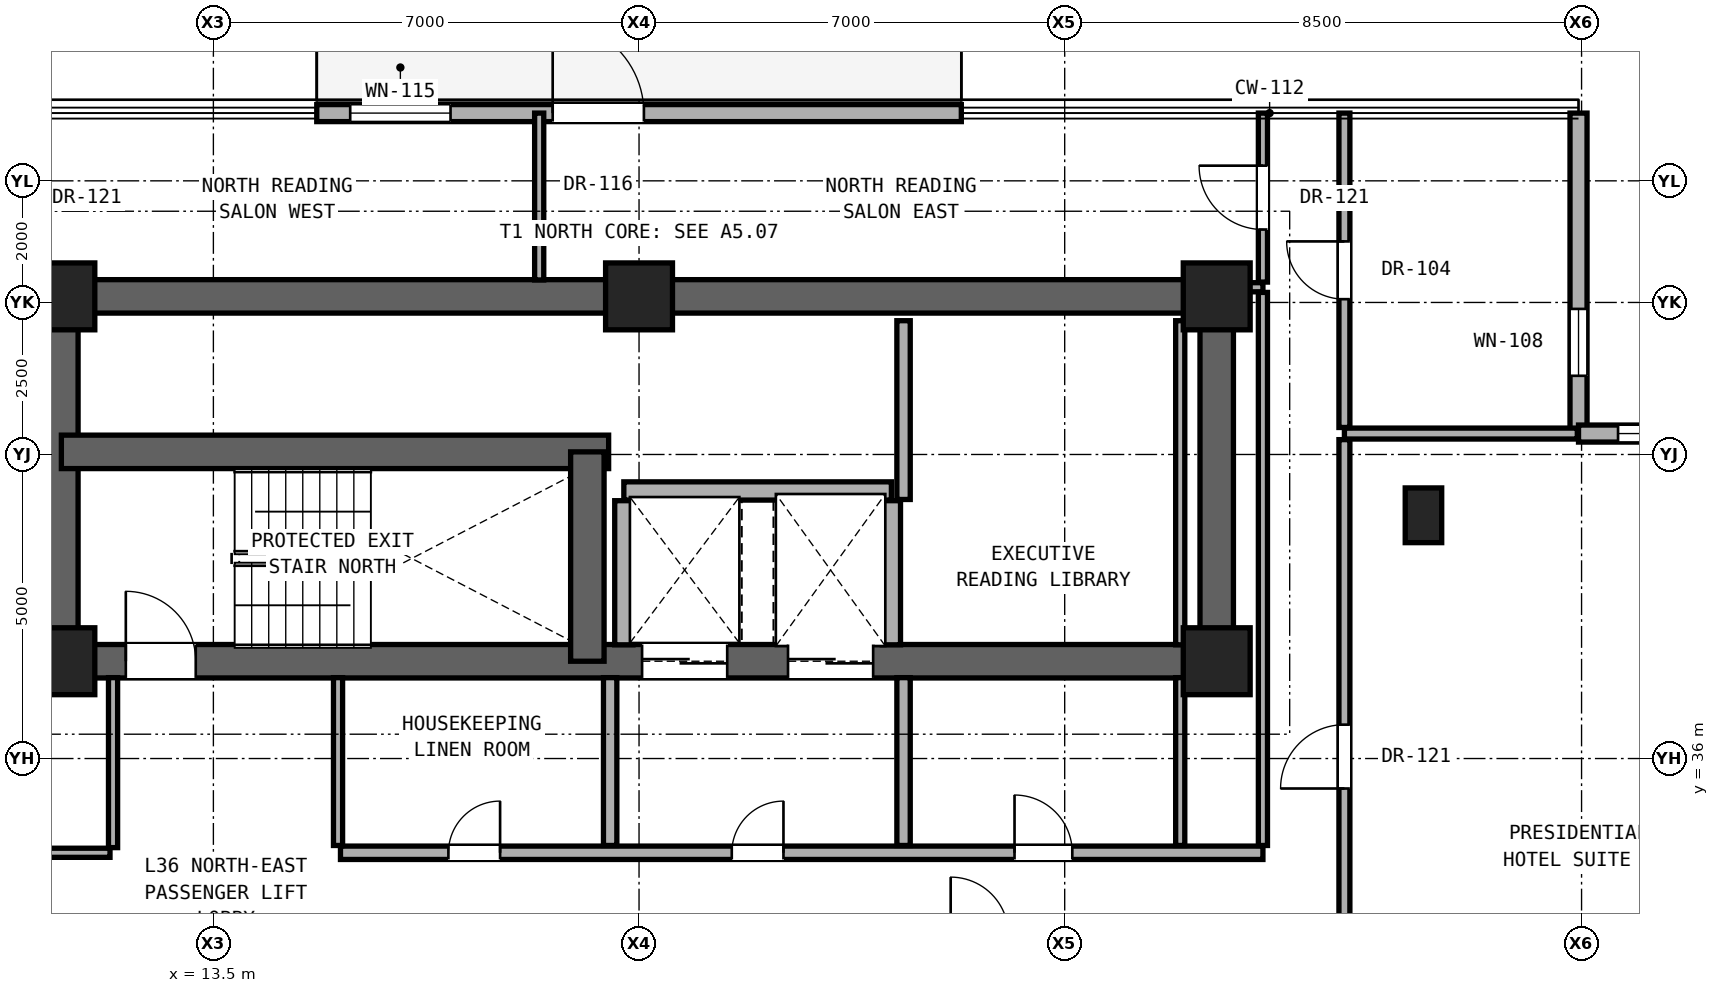
"""IFC4 building model, lengths in metres.
Left out: names, types, materials, properties, quantities, classifications, styles, units other than length and angle.
Written with IfcOpenShell. Run it as: python <this file> out.ifc"""

import sys

from ifc_helpers import new_model, si_unit, direction, frame, frame_2d, origin, origin_2d, place, context, subcontext, project, spatial, rectangle, extrude, element, fill, save


model = new_model("IFC4")
c1 = context("Model", 3, precision=1e-05, world=origin(), true_north=direction((0.0, 1.0)))
c2 = subcontext(c1, "Body", "Model", "MODEL_VIEW")
j1 = project(units=[si_unit("LENGTHUNIT", "METRE"), si_unit("PLANEANGLEUNIT", "RADIAN")], contexts=[c1])
p1 = place(None, origin())
s1 = spatial("IfcSite", under=j1, at=p1, CompositionType="ELEMENT")
p2 = place(p1, origin())
s2 = spatial("IfcBuilding", under=s1, at=p2, CompositionType="ELEMENT")
p3 = place(p2, frame((0.0, 0.0, 128.0)))
s3 = spatial("IfcBuildingStorey", under=s2, at=p3, CompositionType="ELEMENT", Elevation=128.0)
for number, where, z_axis, x_axis in (
    (1, (11.0, 37.6, 0.0), (0.0, 0.0, 1.0), (1.0, 0.0, 0.0)),
    (2, (30.0, 37.6, 0.0), (0.0, 0.0, 1.0), (1.0, 0.0, 0.0)),
    (3, (11.0, 43.6, 0.0), (0.0, 0.0, 1.0), (1.0, 0.0, 0.0)),
    (4, (20.5, 43.6, 0.0), (0.0, 0.0, 1.0), (1.0, 0.0, 0.0)),
    (5, (30.0, 43.6, 0.0), (0.0, 0.0, 1.0), (1.0, 0.0, 0.0)),
):
    element("IfcColumn", number, at=place(p3, frame(where, z_axis=z_axis, x_axis=x_axis)), inside=s3, PredefinedType="COLUMN", context=c2, shape_type="SweptSolid", body=[
        extrude(rectangle(XDim=1.1, YDim=1.1, at=origin_2d()), origin(), (0.0, 0.0, 1.0), 3.3),
    ])
p4 = place(p3, frame((33.4, 40.0, 0.0), z_axis=(0.0, 0.0, 1.0), x_axis=(1.0, 0.0, 0.0)))
e6 = element("IfcColumn", 6, at=p4, inside=s3, PredefinedType="PILASTER", context=c2, shape_type="SweptSolid", body=[
    extrude(rectangle(XDim=0.6, YDim=0.9, at=origin_2d()), origin(), (0.0, 0.0, 1.0), 3.3),
])
p5 = place(p3, frame((11.0, 43.6, 0.0), z_axis=(0.0, 0.0, 1.0), x_axis=(1.0, 0.0, 0.0)))
e7 = element("IfcWall", 7, at=p5, inside=s3, PredefinedType="SHEAR", context=c2, shape_type="SweptSolid", body=[
    extrude(rectangle(XDim=19.0, YDim=0.55, at=frame_2d((9.5, 0.0))), origin(), (0.0, 0.0, 1.0), 3.08),
])
for number, where, z_axis, x_axis in (
    (8, (11.0, 37.6, 0.0), (0.0, 0.0, 1.0), (0.0, 1.0, 0.0)),
    (9, (30.0, 37.6, 0.0), (0.0, 0.0, 1.0), (0.0, 1.0, 0.0)),
):
    element("IfcWall", number, at=place(p3, frame(where, z_axis=z_axis, x_axis=x_axis)), inside=s3, PredefinedType="SHEAR", context=c2, shape_type="SweptSolid", body=[
        extrude(rectangle(XDim=6.0, YDim=0.55, at=frame_2d((3.0, 0.0))), origin(), (0.0, 0.0, 1.0), 3.08),
    ])
p6 = place(p3, frame((11.0, 37.6, 0.0), z_axis=(0.0, 0.0, 1.0), x_axis=(1.0, 0.0, 0.0)))
e10 = element("IfcWall", 10, at=p6, inside=s3, PredefinedType="SHEAR", context=c2, shape_type="SweptSolid", body=[
    extrude(rectangle(XDim=19.0, YDim=0.55, at=frame_2d((9.5, 0.0))), origin(), (0.0, 0.0, 1.0), 3.08),
])
p7 = place(p6, frame((1.06, 0.0, 0.0)))
e11 = element("IfcOpeningElement", 11, at=p7, cuts=e10, PredefinedType="OPENING", context=c2, shape_type="SweptSolid", body=[
    extrude(rectangle(XDim=1.15, YDim=2.2, at=frame_2d((0.575, 1.1))), frame((0.0, 0.285, 0.0), z_axis=(0.0, -1.0, 0.0), x_axis=(1.0, 0.0, 0.0)), (0.0, 0.0, 1.0), 0.57),
])
p8 = place(p6, frame((9.55, 0.0, 0.0)))
e12 = element("IfcOpeningElement", 12, at=p8, cuts=e10, PredefinedType="OPENING", context=c2, shape_type="SweptSolid", body=[
    extrude(rectangle(XDim=1.4, YDim=2.35, at=frame_2d((0.7, 1.175))), frame((0.0, 0.285, 0.0), z_axis=(0.0, -1.0, 0.0), x_axis=(1.0, 0.0, 0.0)), (0.0, 0.0, 1.0), 0.57),
])
p9 = place(p6, frame((11.95, 0.0, 0.0)))
e13 = element("IfcOpeningElement", 13, at=p9, cuts=e10, PredefinedType="OPENING", context=c2, shape_type="SweptSolid", body=[
    extrude(rectangle(XDim=1.4, YDim=2.35, at=frame_2d((0.7, 1.175))), frame((0.0, 0.285, 0.0), z_axis=(0.0, -1.0, 0.0), x_axis=(1.0, 0.0, 0.0)), (0.0, 0.0, 1.0), 0.57),
])
p10 = place(p3, frame((11.0, 41.043, 0.0), z_axis=(0.0, 0.0, 1.0), x_axis=(1.0, 0.0, 0.0)))
e14 = element("IfcWall", 14, at=p10, inside=s3, PredefinedType="SHEAR", context=c2, shape_type="SweptSolid", body=[
    extrude(rectangle(XDim=9.0, YDim=0.55, at=frame_2d((4.5, 0.0))), origin(), (0.0, 0.0, 1.0), 3.08),
])
p11 = place(p3, frame((19.65, 37.6, 0.0), z_axis=(0.0, 0.0, 1.0), x_axis=(0.0, 1.0, 0.0)))
e15 = element("IfcWall", 15, at=p11, inside=s3, PredefinedType="SHEAR", context=c2, shape_type="SweptSolid", body=[
    extrude(rectangle(XDim=3.443, YDim=0.55, at=frame_2d((1.721, 0.0))), origin(), (0.0, 0.0, 1.0), 3.08),
])
p12 = place(p3, frame((15.2, 46.614, 0.0), z_axis=(0.0, 0.0, 1.0), x_axis=(1.0, 0.0, 0.0)))
e16 = element("IfcWall", 16, at=p12, inside=s3, PredefinedType="SOLIDWALL", context=c2, shape_type="SweptSolid", body=[
    extrude(rectangle(XDim=10.6, YDim=0.28, at=frame_2d((5.3, 0.0))), origin(), (0.0, 0.0, 1.0), 3.04),
])
p13 = place(p12, frame((0.55, 0.0, 0.69)))
e17 = element("IfcOpeningElement", 17, at=p13, cuts=e16, PredefinedType="OPENING", context=c2, shape_type="SweptSolid", body=[
    extrude(rectangle(XDim=1.65, YDim=2.2, at=frame_2d((0.825, 1.1))), frame((0.0, 0.15, 0.0), z_axis=(0.0, -1.0, 0.0), x_axis=(1.0, 0.0, 0.0)), (0.0, 0.0, 1.0), 0.3),
])
p14 = place(p12, frame((3.88, 0.0, 0.0)))
e18 = element("IfcOpeningElement", 18, at=p14, cuts=e16, PredefinedType="OPENING", context=c2, shape_type="SweptSolid", body=[
    extrude(rectangle(XDim=1.5, YDim=2.3, at=frame_2d((0.75, 1.15))), frame((0.0, 0.15, 0.0), z_axis=(0.0, -1.0, 0.0), x_axis=(1.0, 0.0, 0.0)), (0.0, 0.0, 1.0), 0.3),
])
p15 = place(p3, frame((35.95, 41.344, 0.0), z_axis=(0.0, 0.0, 1.0), x_axis=(0.0, 1.0, 0.0)))
e19 = element("IfcWall", 19, at=p15, inside=s3, PredefinedType="SOLIDWALL", context=c2, shape_type="SweptSolid", body=[
    extrude(rectangle(XDim=5.27, YDim=0.28, at=frame_2d((2.635, 0.0))), origin(), (0.0, 0.0, 1.0), 3.06),
])
p16 = place(p15, frame((0.95, 0.0, 0.85)))
e20 = element("IfcOpeningElement", 20, at=p16, cuts=e19, PredefinedType="OPENING", context=c2, shape_type="SweptSolid", body=[
    extrude(rectangle(XDim=1.1, YDim=2.0, at=frame_2d((0.55, 1.0))), frame((0.0, 0.15, 0.0), z_axis=(0.0, -1.0, 0.0), x_axis=(1.0, 0.0, 0.0)), (0.0, 0.0, 1.0), 0.3),
])
p17 = place(p3, frame((41.22, 41.344, 0.0), z_axis=(0.0, 0.0, 1.0), x_axis=(-1.0, 0.0, 0.0)))
e21 = element("IfcWall", 21, at=p17, inside=s3, PredefinedType="SOLIDWALL", context=c2, shape_type="SweptSolid", body=[
    extrude(rectangle(XDim=5.27, YDim=0.28, at=frame_2d((2.635, 0.0))), origin(), (0.0, 0.0, 1.0), 3.06),
])
p18 = place(p17, frame((3.52, 0.0, 0.85)))
e22 = element("IfcOpeningElement", 22, at=p18, cuts=e21, PredefinedType="OPENING", context=c2, shape_type="SweptSolid", body=[
    extrude(rectangle(XDim=1.1, YDim=2.0, at=frame_2d((0.55, 1.0))), frame((0.0, 0.15, 0.0), z_axis=(0.0, -1.0, 0.0), x_axis=(1.0, 0.0, 0.0)), (0.0, 0.0, 1.0), 0.3),
])
p19 = place(p3, frame((10.24, 34.45, 0.0), z_axis=(0.0, 0.0, 1.0), x_axis=(1.0, 0.0, 0.0)))
e23 = element("IfcWall", 23, at=p19, inside=s3, PredefinedType="PARTITIONING", context=c2, shape_type="SweptSolid", body=[
    extrude(rectangle(XDim=1.56, YDim=0.15, at=frame_2d((0.78, 0.0))), origin(), (0.0, 0.0, 1.0), 2.216),
])
p20 = place(p3, frame((15.59, 34.45, 0.0), z_axis=(0.0, 0.0, 1.0), x_axis=(1.0, 0.0, 0.0)))
e24 = element("IfcWall", 24, at=p20, inside=s3, PredefinedType="SOLIDWALL", context=c2, shape_type="SweptSolid", body=[
    extrude(rectangle(XDim=15.17, YDim=0.22, at=frame_2d((7.585, 0.0))), origin(), (0.0, 0.0, 1.0), 2.216),
])
p21 = place(p20, frame((6.435, 0.0, 0.0)))
e25 = element("IfcOpeningElement", 25, at=p21, cuts=e24, PredefinedType="OPENING", context=c2, shape_type="SweptSolid", body=[
    extrude(rectangle(XDim=0.85, YDim=2.01, at=frame_2d((0.425, 1.005))), frame((0.0, 0.12, 0.0), z_axis=(0.0, -1.0, 0.0), x_axis=(1.0, 0.0, 0.0)), (0.0, 0.0, 1.0), 0.24),
])
p22 = place(p20, frame((11.085, 0.0, 0.0)))
e26 = element("IfcOpeningElement", 26, at=p22, cuts=e24, PredefinedType="OPENING", context=c2, shape_type="SweptSolid", body=[
    extrude(rectangle(XDim=0.95, YDim=2.15, at=frame_2d((0.475, 1.075))), frame((0.0, 0.12, 0.0), z_axis=(0.0, -1.0, 0.0), x_axis=(1.0, 0.0, 0.0)), (0.0, 0.0, 1.0), 0.24),
])
p23 = place(p20, frame((1.775, 0.0, 0.0)))
e27 = element("IfcOpeningElement", 27, at=p23, cuts=e24, PredefinedType="OPENING", context=c2, shape_type="SweptSolid", body=[
    extrude(rectangle(XDim=0.85, YDim=2.01, at=frame_2d((0.425, 1.005))), frame((0.0, 0.12, 0.0), z_axis=(0.0, -1.0, 0.0), x_axis=(1.0, 0.0, 0.0)), (0.0, 0.0, 1.0), 0.24),
])
p24 = place(p3, frame((20.25, 40.4, 0.0), z_axis=(0.0, 0.0, 1.0), x_axis=(1.0, 0.0, 0.0)))
e28 = element("IfcWall", 28, at=p24, inside=s3, PredefinedType="SOLIDWALL", context=c2, shape_type="SweptSolid", body=[
    extrude(rectangle(XDim=4.4, YDim=0.3, at=frame_2d((2.2, 0.0))), origin(), (0.0, 0.0, 1.0), 3.08),
])
p25 = place(p3, frame((32.1, 41.344, 0.0), z_axis=(0.0, 0.0, 1.0), x_axis=(1.0, 0.0, 0.0)))
e29 = element("IfcWall", 29, at=p25, inside=s3, PredefinedType="PARTITIONING", context=c2, shape_type="SweptSolid", body=[
    extrude(rectangle(XDim=3.83, YDim=0.18, at=frame_2d((1.915, 0.0))), origin(), (0.0, 0.0, 1.0), 3.08),
])
p26 = place(p3, frame((30.27, 43.75, 0.0), z_axis=(0.0, 0.0, 1.0), x_axis=(1.0, 0.0, 0.0)))
e30 = element("IfcWall", 30, at=p26, inside=s3, PredefinedType="PARTITIONING", context=c2, shape_type="SweptSolid", body=[
    extrude(rectangle(XDim=0.49, YDim=0.15, at=frame_2d((0.245, 0.0))), origin(), (0.0, 0.0, 1.0), 3.08),
])
p27 = place(p3, frame((11.85, 34.535, 0.0), z_axis=(0.0, 0.0, 1.0), x_axis=(0.0, 1.0, 0.0)))
e31 = element("IfcWall", 31, at=p27, inside=s3, PredefinedType="PARTITIONING", context=c2, shape_type="SweptSolid", body=[
    extrude(rectangle(XDim=2.795, YDim=0.15, at=frame_2d((1.397, 0.0))), origin(), (0.0, 0.0, 1.0), 3.08),
])
p28 = place(p3, frame((15.55, 34.57, 0.0), z_axis=(0.0, 0.0, 1.0), x_axis=(0.0, 1.0, 0.0)))
e32 = element("IfcWall", 32, at=p28, inside=s3, PredefinedType="PARTITIONING", context=c2, shape_type="SweptSolid", body=[
    extrude(rectangle(XDim=2.76, YDim=0.15, at=frame_2d((1.38, 0.0))), origin(), (0.0, 0.0, 1.0), 2.609),
])
p29 = place(p3, frame((18.858, 43.87, 0.0), z_axis=(0.0, 0.0, 1.0), x_axis=(0.0, 1.0, 0.0)))
e33 = element("IfcWall", 33, at=p29, inside=s3, PredefinedType="PARTITIONING", context=c2, shape_type="SweptSolid", body=[
    extrude(rectangle(XDim=2.744, YDim=0.15, at=frame_2d((1.372, 0.0))), origin(), (0.0, 0.0, 1.0), 3.08),
])
p30 = place(p3, frame((20.025, 34.57, 0.0), z_axis=(0.0, 0.0, 1.0), x_axis=(0.0, 1.0, 0.0)))
e34 = element("IfcWall", 34, at=p30, inside=s3, PredefinedType="SOLIDWALL", context=c2, shape_type="SweptSolid", body=[
    extrude(rectangle(XDim=2.76, YDim=0.22, at=frame_2d((1.38, 0.0))), origin(), (0.0, 0.0, 1.0), 3.08),
])
for number, where, z_axis, x_axis in (
    (35, (20.25, 37.87, 0.0), (0.0, 0.0, 1.0), (0.0, 1.0, 0.0)),
    (36, (24.65, 37.87, 0.0), (0.0, 0.0, 1.0), (0.0, 1.0, 0.0)),
):
    element("IfcWall", number, at=place(p3, frame(where, z_axis=z_axis, x_axis=x_axis)), inside=s3, PredefinedType="SOLIDWALL", context=c2, shape_type="SweptSolid", body=[
        extrude(rectangle(XDim=2.37, YDim=0.3, at=frame_2d((1.185, 0.0))), origin(), (0.0, 0.0, 1.0), 3.08),
    ])
p31 = place(p3, frame((24.85, 34.57, 0.0), z_axis=(0.0, 0.0, 1.0), x_axis=(0.0, 1.0, 0.0)))
e37 = element("IfcWall", 37, at=p31, inside=s3, PredefinedType="SOLIDWALL", context=c2, shape_type="SweptSolid", body=[
    extrude(rectangle(XDim=2.76, YDim=0.22, at=frame_2d((1.38, 0.0))), origin(), (0.0, 0.0, 1.0), 3.08),
])
p32 = place(p3, frame((24.85, 40.26, 0.0), z_axis=(0.0, 0.0, 1.0), x_axis=(0.0, 1.0, 0.0)))
e38 = element("IfcWall", 38, at=p32, inside=s3, PredefinedType="SOLIDWALL", context=c2, shape_type="SweptSolid", body=[
    extrude(rectangle(XDim=2.94, YDim=0.22, at=frame_2d((1.47, 0.0))), origin(), (0.0, 0.0, 1.0), 3.08),
])
p33 = place(p3, frame((29.4, 34.57, 0.0), z_axis=(0.0, 0.0, 1.0), x_axis=(0.0, 1.0, 0.0)))
e39 = element("IfcWall", 39, at=p33, inside=s3, PredefinedType="PARTITIONING", context=c2, shape_type="SweptSolid", body=[
    extrude(rectangle(XDim=2.76, YDim=0.15, at=frame_2d((1.38, 0.0))), origin(), (0.0, 0.0, 1.0), 3.08),
])
p34 = place(p3, frame((29.4, 37.87, 0.0), z_axis=(0.0, 0.0, 1.0), x_axis=(0.0, 1.0, 0.0)))
e40 = element("IfcWall", 40, at=p34, inside=s3, PredefinedType="PARTITIONING", context=c2, shape_type="SweptSolid", body=[
    extrude(rectangle(XDim=5.33, YDim=0.15, at=frame_2d((2.665, 0.0))), origin(), (0.0, 0.0, 1.0), 3.08),
])
p35 = place(p3, frame((30.76, 34.57, 0.0), z_axis=(0.0, 0.0, 1.0), x_axis=(0.0, 1.0, 0.0)))
e41 = element("IfcWall", 41, at=p35, inside=s3, PredefinedType="PARTITIONING", context=c2, shape_type="SweptSolid", body=[
    extrude(rectangle(XDim=9.095, YDim=0.15, at=frame_2d((4.547, 0.0))), origin(), (0.0, 0.0, 1.0), 2.456),
])
p36 = place(p3, frame((30.76, 43.835, 0.0), z_axis=(0.0, 0.0, 1.0), x_axis=(0.0, 1.0, 0.0)))
e42 = element("IfcWall", 42, at=p36, inside=s3, PredefinedType="PARTITIONING", context=c2, shape_type="SweptSolid", body=[
    extrude(rectangle(XDim=2.779, YDim=0.15, at=frame_2d((1.39, 0.0))), origin(), (0.0, 0.0, 1.0), 3.08),
])
p37 = place(p36, frame((0.865, 0.0, 0.0)))
e43 = element("IfcOpeningElement", 43, at=p37, cuts=e42, PredefinedType="OPENING", context=c2, shape_type="SweptSolid", body=[
    extrude(rectangle(XDim=1.05, YDim=2.2, at=frame_2d((0.525, 1.1))), frame((0.0, 0.085, 0.0), z_axis=(0.0, -1.0, 0.0), x_axis=(1.0, 0.0, 0.0)), (0.0, 0.0, 1.0), 0.17),
])
p38 = place(p3, frame((32.1, 30.82, 0.0), z_axis=(0.0, 0.0, 1.0), x_axis=(0.0, 1.0, 0.0)))
e44 = element("IfcWall", 44, at=p38, inside=s3, PredefinedType="PARTITIONING", context=c2, shape_type="SweptSolid", body=[
    extrude(rectangle(XDim=10.424, YDim=0.18, at=frame_2d((5.212, 0.0))), origin(), (0.0, 0.0, 1.0), 2.299),
])
p39 = place(p38, frame((4.687, 0.0, 0.0)))
e45 = element("IfcOpeningElement", 45, at=p39, cuts=e44, PredefinedType="OPENING", context=c2, shape_type="SweptSolid", body=[
    extrude(rectangle(XDim=1.05, YDim=2.2, at=frame_2d((0.525, 1.1))), frame((0.0, 0.1, 0.0), z_axis=(0.0, -1.0, 0.0), x_axis=(1.0, 0.0, 0.0)), (0.0, 0.0, 1.0), 0.2),
])
p40 = place(p3, frame((32.1, 41.444, 0.0), z_axis=(0.0, 0.0, 1.0), x_axis=(0.0, 1.0, 0.0)))
e46 = element("IfcWall", 46, at=p40, inside=s3, PredefinedType="PARTITIONING", context=c2, shape_type="SweptSolid", body=[
    extrude(rectangle(XDim=5.17, YDim=0.18, at=frame_2d((2.585, 0.0))), origin(), (0.0, 0.0, 1.0), 3.08),
])
p41 = place(p40, frame((2.11, 0.0, 0.0)))
e47 = element("IfcOpeningElement", 47, at=p41, cuts=e46, PredefinedType="OPENING", context=c2, shape_type="SweptSolid", body=[
    extrude(rectangle(XDim=0.95, YDim=2.15, at=frame_2d((0.475, 1.075))), frame((0.0, 0.1, 0.0), z_axis=(0.0, -1.0, 0.0), x_axis=(1.0, 0.0, 0.0)), (0.0, 0.0, 1.0), 0.2),
])
p42 = place(p13, origin())
e48 = element("IfcWindow", 48, at=p42, inside=s3, PartitioningType="SINGLE_PANEL", PredefinedType="WINDOW", context=c2, shape_type="SweptSolid", body=[
    extrude(rectangle(XDim=1.65, YDim=2.2, at=frame_2d((0.825, 1.1))), frame((0.0, 0.03, 0.0), z_axis=(0.0, -1.0, 0.0), x_axis=(1.0, 0.0, 0.0)), (0.0, 0.0, 1.0), 0.06),
])
fill(e17, e48)
p43 = place(p14, origin())
e49 = element("IfcDoor", 49, at=p43, inside=s3, OperationType="SINGLE_SWING_LEFT", PredefinedType="DOOR", context=c2, shape_type="SweptSolid", body=[
    extrude(rectangle(XDim=1.5, YDim=2.3, at=frame_2d((0.75, 1.15))), frame((0.0, 0.025, 0.0), z_axis=(0.0, -1.0, 0.0), x_axis=(1.0, 0.0, 0.0)), (0.0, 0.0, 1.0), 0.05),
])
fill(e18, e49)
p44 = place(p16, origin())
e50 = element("IfcWindow", 50, at=p44, inside=s3, PartitioningType="SINGLE_PANEL", PredefinedType="WINDOW", context=c2, shape_type="SweptSolid", body=[
    extrude(rectangle(XDim=1.1, YDim=2.0, at=frame_2d((0.55, 1.0))), frame((0.0, 0.03, 0.0), z_axis=(0.0, -1.0, 0.0), x_axis=(1.0, 0.0, 0.0)), (0.0, 0.0, 1.0), 0.06),
])
fill(e20, e50)
p45 = place(p18, origin())
e51 = element("IfcWindow", 51, at=p45, inside=s3, PartitioningType="SINGLE_PANEL", PredefinedType="WINDOW", context=c2, shape_type="SweptSolid", body=[
    extrude(rectangle(XDim=1.1, YDim=2.0, at=frame_2d((0.55, 1.0))), frame((0.0, 0.03, 0.0), z_axis=(0.0, -1.0, 0.0), x_axis=(1.0, 0.0, 0.0)), (0.0, 0.0, 1.0), 0.06),
])
fill(e22, e51)
p46 = place(p7, origin())
e52 = element("IfcDoor", 52, at=p46, inside=s3, OperationType="SINGLE_SWING_LEFT", PredefinedType="DOOR", context=c2, shape_type="SweptSolid", body=[
    extrude(rectangle(XDim=1.15, YDim=2.2, at=frame_2d((0.575, 1.1))), frame((0.0, 0.025, 0.0), z_axis=(0.0, -1.0, 0.0), x_axis=(1.0, 0.0, 0.0)), (0.0, 0.0, 1.0), 0.05),
])
fill(e11, e52)
p47 = place(p21, origin())
e53 = element("IfcDoor", 53, at=p47, inside=s3, OperationType="SINGLE_SWING_RIGHT", PredefinedType="DOOR", context=c2, shape_type="SweptSolid", body=[
    extrude(rectangle(XDim=0.85, YDim=2.01, at=frame_2d((0.425, 1.005))), frame((0.0, 0.025, 0.0), z_axis=(0.0, -1.0, 0.0), x_axis=(1.0, 0.0, 0.0)), (0.0, 0.0, 1.0), 0.05),
])
fill(e25, e53)
p48 = place(p22, origin())
e54 = element("IfcDoor", 54, at=p48, inside=s3, OperationType="SINGLE_SWING_LEFT", PredefinedType="DOOR", context=c2, shape_type="SweptSolid", body=[
    extrude(rectangle(XDim=0.95, YDim=2.15, at=frame_2d((0.475, 1.075))), frame((0.0, 0.025, 0.0), z_axis=(0.0, -1.0, 0.0), x_axis=(1.0, 0.0, 0.0)), (0.0, 0.0, 1.0), 0.05),
])
fill(e26, e54)
p49 = place(p23, origin())
e55 = element("IfcDoor", 55, at=p49, inside=s3, OperationType="SINGLE_SWING_RIGHT", PredefinedType="DOOR", context=c2, shape_type="SweptSolid", body=[
    extrude(rectangle(XDim=0.85, YDim=2.01, at=frame_2d((0.425, 1.005))), frame((0.0, 0.025, 0.0), z_axis=(0.0, -1.0, 0.0), x_axis=(1.0, 0.0, 0.0)), (0.0, 0.0, 1.0), 0.05),
])
fill(e27, e55)
p50 = place(p39, origin())
e56 = element("IfcDoor", 56, at=p50, inside=s3, OperationType="SINGLE_SWING_LEFT", PredefinedType="DOOR", context=c2, shape_type="SweptSolid", body=[
    extrude(rectangle(XDim=1.05, YDim=2.2, at=frame_2d((0.525, 1.1))), frame((0.0, 0.025, 0.0), z_axis=(0.0, -1.0, 0.0), x_axis=(1.0, 0.0, 0.0)), (0.0, 0.0, 1.0), 0.05),
])
fill(e45, e56)
p51 = place(p37, origin())
e57 = element("IfcDoor", 57, at=p51, inside=s3, OperationType="SINGLE_SWING_RIGHT", PredefinedType="DOOR", context=c2, shape_type="SweptSolid", body=[
    extrude(rectangle(XDim=1.05, YDim=2.2, at=frame_2d((0.525, 1.1))), frame((0.0, 0.025, 0.0), z_axis=(0.0, -1.0, 0.0), x_axis=(1.0, 0.0, 0.0)), (0.0, 0.0, 1.0), 0.05),
])
fill(e43, e57)
p52 = place(p41, origin())
e58 = element("IfcDoor", 58, at=p52, inside=s3, OperationType="SINGLE_SWING_RIGHT", PredefinedType="DOOR", context=c2, shape_type="SweptSolid", body=[
    extrude(rectangle(XDim=0.95, YDim=2.15, at=frame_2d((0.475, 1.075))), frame((0.0, 0.025, 0.0), z_axis=(0.0, -1.0, 0.0), x_axis=(1.0, 0.0, 0.0)), (0.0, 0.0, 1.0), 0.05),
])
fill(e47, e58)
p53 = place(p8, origin())
e59 = element("IfcDoor", 59, at=p53, inside=s3, OperationType="DOUBLE_DOOR_SLIDING", PredefinedType="DOOR", context=c2, shape_type="SweptSolid", body=[
    extrude(rectangle(XDim=1.4, YDim=2.35, at=frame_2d((0.7, 1.175))), frame((0.0, 0.025, 0.0), z_axis=(0.0, -1.0, 0.0), x_axis=(1.0, 0.0, 0.0)), (0.0, 0.0, 1.0), 0.05),
])
fill(e12, e59)
p54 = place(p9, origin())
e60 = element("IfcDoor", 60, at=p54, inside=s3, OperationType="DOUBLE_DOOR_SLIDING", PredefinedType="DOOR", context=c2, shape_type="SweptSolid", body=[
    extrude(rectangle(XDim=1.4, YDim=2.35, at=frame_2d((0.7, 1.175))), frame((0.0, 0.025, 0.0), z_axis=(0.0, -1.0, 0.0), x_axis=(1.0, 0.0, 0.0)), (0.0, 0.0, 1.0), 0.05),
])
fill(e13, e60)
save(model, sys.argv[1])
